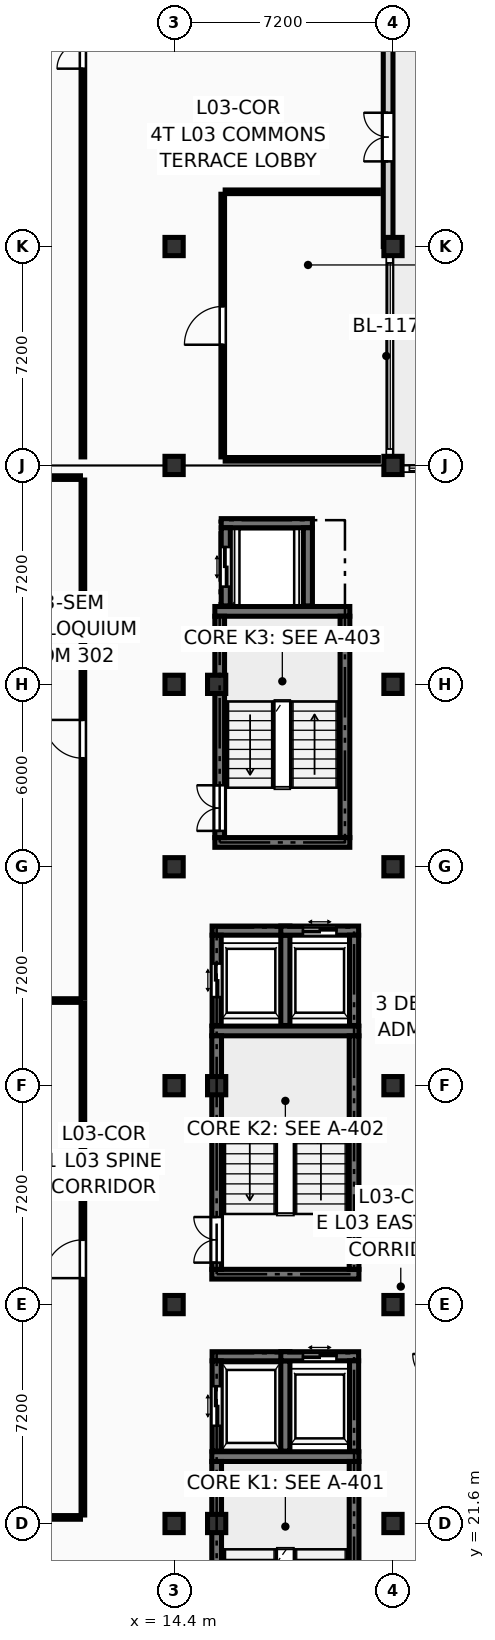
"""IFC4 building model, lengths in metres.
Left out: names, types, materials, properties, quantities, classifications, styles, units other than length and angle.
Written with IfcOpenShell. Run it as: python <this file> out.ifc"""

import sys

from ifc_helpers import new_model, si_unit, direction, frame, frame_2d, origin, origin_2d, place, context, subcontext, project, spatial, rectangle, extrude, element, fill, save


model = new_model("IFC4")
c1 = context("Model", 3, precision=1e-05, world=origin(), true_north=direction((0.0, 1.0)))
c2 = subcontext(c1, "Body", "Model", "MODEL_VIEW")
j1 = project(units=[si_unit("LENGTHUNIT", "METRE"), si_unit("PLANEANGLEUNIT", "RADIAN")], contexts=[c1])
p1 = place(None, origin())
s1 = spatial("IfcSite", under=j1, at=p1, CompositionType="ELEMENT")
p2 = place(p1, origin())
s2 = spatial("IfcBuilding", under=s1, at=p2, CompositionType="ELEMENT")
p3 = place(p2, frame((0.0, 0.0, 12.15)))
s3 = spatial("IfcBuildingStorey", under=s2, at=p3, CompositionType="ELEMENT", Elevation=12.15)
for number, where, z_axis, x_axis in (
    (1, (14.4, 21.6, 0.0), (0.0, 0.0, 1.0), (1.0, 0.0, 0.0)),
    (2, (14.4, 28.8, 0.0), (0.0, 0.0, 1.0), (1.0, 0.0, 0.0)),
    (3, (14.4, 36.0, 0.0), (0.0, 0.0, 1.0), (1.0, 0.0, 0.0)),
    (4, (14.4, 43.2, 0.0), (0.0, 0.0, 1.0), (1.0, 0.0, 0.0)),
    (5, (14.4, 49.2, 0.0), (0.0, 0.0, 1.0), (1.0, 0.0, 0.0)),
    (6, (14.4, 56.4, 0.0), (0.0, 0.0, 1.0), (1.0, 0.0, 0.0)),
    (7, (14.4, 63.6, 0.0), (0.0, 0.0, 1.0), (1.0, 0.0, 0.0)),
    (8, (15.8, 21.6, 0.0), (0.0, 0.0, 1.0), (1.0, 0.0, 0.0)),
    (9, (15.8, 36.0, 0.0), (0.0, 0.0, 1.0), (1.0, 0.0, 0.0)),
    (10, (15.8, 49.2, 0.0), (0.0, 0.0, 1.0), (1.0, 0.0, 0.0)),
    (11, (21.6, 21.6, 0.0), (0.0, 0.0, 1.0), (1.0, 0.0, 0.0)),
    (12, (21.6, 28.8, 0.0), (0.0, 0.0, 1.0), (1.0, 0.0, 0.0)),
    (13, (21.6, 36.0, 0.0), (0.0, 0.0, 1.0), (1.0, 0.0, 0.0)),
    (14, (21.6, 43.2, 0.0), (0.0, 0.0, 1.0), (1.0, 0.0, 0.0)),
    (15, (21.6, 49.2, 0.0), (0.0, 0.0, 1.0), (1.0, 0.0, 0.0)),
    (16, (21.6, 56.4, 0.0), (0.0, 0.0, 1.0), (1.0, 0.0, 0.0)),
    (17, (21.6, 63.6, 0.0), (0.0, 0.0, 1.0), (1.0, 0.0, 0.0)),
):
    element("IfcColumn", number, at=place(p3, frame(where, z_axis=z_axis, x_axis=x_axis)), inside=s3, PredefinedType="COLUMN", context=c2, shape_type="SweptSolid", body=[
        extrude(rectangle(XDim=0.6, YDim=0.6, at=origin_2d()), origin(), (0.0, 0.0, 1.0), 3.6),
    ])
p4 = place(p3, frame((21.44, 63.6, 0.0), z_axis=(0.0, 0.0, 1.0), x_axis=(0.0, 1.0, 0.0)))
e18 = element("IfcWall", 18, at=p4, inside=s3, PredefinedType="SOLIDWALL", context=c2, shape_type="SweptSolid", body=[
    extrude(rectangle(XDim=7.2, YDim=0.32, at=frame_2d((3.6, 0.0))), origin(), (0.0, 0.0, 1.0), 2.84),
])
p5 = place(p4, frame((2.8, 0.0, 0.0)))
e19 = element("IfcOpeningElement", 19, at=p5, cuts=e18, PredefinedType="OPENING", context=c2, shape_type="SweptSolid", body=[
    extrude(rectangle(XDim=1.6, YDim=2.25, at=frame_2d((0.8, 1.125))), frame((0.0, 0.172, 0.0), z_axis=(0.0, -1.0, 0.0), x_axis=(1.0, 0.0, 0.0)), (0.0, 0.0, 1.0), 0.344),
])
p6 = place(p3, frame((15.64, 23.8, 0.0), z_axis=(0.0, 0.0, 1.0), x_axis=(1.0, 0.0, 0.0)))
e20 = element("IfcWall", 20, at=p6, inside=s3, PredefinedType="SHEAR", context=c2, shape_type="SweptSolid", body=[
    extrude(rectangle(XDim=4.84, YDim=0.32, at=frame_2d((2.42, 0.0))), origin(), (0.0, 0.0, 1.0), 3.39),
])
p7 = place(p3, frame((15.8, 15.96, 0.0), z_axis=(0.0, 0.0, 1.0), x_axis=(0.0, 1.0, 0.0)))
e21 = element("IfcWall", 21, at=p7, inside=s3, PredefinedType="SHEAR", context=c2, shape_type="SweptSolid", body=[
    extrude(rectangle(XDim=7.68, YDim=0.32, at=frame_2d((3.84, 0.0))), origin(), (0.0, 0.0, 1.0), 3.39),
])
p8 = place(p7, frame((0.22, 0.0, 0.0)))
e22 = element("IfcOpeningElement", 22, at=p8, cuts=e21, PredefinedType="OPENING", context=c2, shape_type="SweptSolid", body=[
    extrude(rectangle(XDim=1.5, YDim=2.2, at=frame_2d((0.75, 1.1))), frame((0.0, 0.172, 0.0), z_axis=(0.0, -1.0, 0.0), x_axis=(1.0, 0.0, 0.0)), (0.0, 0.0, 1.0), 0.344),
])
p9 = place(p3, frame((20.32, 15.96, 0.0), z_axis=(0.0, 0.0, 1.0), x_axis=(0.0, 1.0, 0.0)))
e23 = element("IfcWall", 23, at=p9, inside=s3, PredefinedType="SHEAR", context=c2, shape_type="SweptSolid", body=[
    extrude(rectangle(XDim=7.68, YDim=0.32, at=frame_2d((3.84, 0.0))), origin(), (0.0, 0.0, 1.0), 3.39),
])
for number, where, z_axis, x_axis in (
    (24, (15.64, 29.8, 0.0), (0.0, 0.0, 1.0), (1.0, 0.0, 0.0)),
    (25, (15.64, 37.8, 0.0), (0.0, 0.0, 1.0), (1.0, 0.0, 0.0)),
):
    element("IfcWall", number, at=place(p3, frame(where, z_axis=z_axis, x_axis=x_axis)), inside=s3, PredefinedType="SHEAR", context=c2, shape_type="SweptSolid", body=[
        extrude(rectangle(XDim=4.84, YDim=0.32, at=frame_2d((2.42, 0.0))), origin(), (0.0, 0.0, 1.0), 3.39),
    ])
p10 = place(p3, frame((15.8, 29.96, 0.0), z_axis=(0.0, 0.0, 1.0), x_axis=(0.0, 1.0, 0.0)))
e26 = element("IfcWall", 26, at=p10, inside=s3, PredefinedType="SHEAR", context=c2, shape_type="SweptSolid", body=[
    extrude(rectangle(XDim=7.68, YDim=0.32, at=frame_2d((3.84, 0.0))), origin(), (0.0, 0.0, 1.0), 3.39),
])
p11 = place(p10, frame((0.22, 0.0, 0.0)))
e27 = element("IfcOpeningElement", 27, at=p11, cuts=e26, PredefinedType="OPENING", context=c2, shape_type="SweptSolid", body=[
    extrude(rectangle(XDim=1.5, YDim=2.2, at=frame_2d((0.75, 1.1))), frame((0.0, 0.172, 0.0), z_axis=(0.0, -1.0, 0.0), x_axis=(1.0, 0.0, 0.0)), (0.0, 0.0, 1.0), 0.344),
])
p12 = place(p3, frame((20.32, 29.96, 0.0), z_axis=(0.0, 0.0, 1.0), x_axis=(0.0, 1.0, 0.0)))
e28 = element("IfcWall", 28, at=p12, inside=s3, PredefinedType="SHEAR", context=c2, shape_type="SweptSolid", body=[
    extrude(rectangle(XDim=7.68, YDim=0.32, at=frame_2d((3.84, 0.0))), origin(), (0.0, 0.0, 1.0), 3.39),
])
for number, where, z_axis, x_axis in (
    (29, (15.74, 44.0, 0.0), (0.0, 0.0, 1.0), (1.0, 0.0, 0.0)),
    (30, (15.74, 51.6, 0.0), (0.0, 0.0, 1.0), (1.0, 0.0, 0.0)),
):
    element("IfcWall", number, at=place(p3, frame(where, z_axis=z_axis, x_axis=x_axis)), inside=s3, PredefinedType="SHEAR", context=c2, shape_type="SweptSolid", body=[
        extrude(rectangle(XDim=4.44, YDim=0.32, at=frame_2d((2.22, 0.0))), origin(), (0.0, 0.0, 1.0), 3.39),
    ])
p13 = place(p3, frame((15.9, 44.16, 0.0), z_axis=(0.0, 0.0, 1.0), x_axis=(0.0, 1.0, 0.0)))
e31 = element("IfcWall", 31, at=p13, inside=s3, PredefinedType="SHEAR", context=c2, shape_type="SweptSolid", body=[
    extrude(rectangle(XDim=7.28, YDim=0.32, at=frame_2d((3.64, 0.0))), origin(), (0.0, 0.0, 1.0), 3.39),
])
p14 = place(p13, frame((0.22, 0.0, 0.0)))
e32 = element("IfcOpeningElement", 32, at=p14, cuts=e31, PredefinedType="OPENING", context=c2, shape_type="SweptSolid", body=[
    extrude(rectangle(XDim=1.5, YDim=2.2, at=frame_2d((0.75, 1.1))), frame((0.0, 0.172, 0.0), z_axis=(0.0, -1.0, 0.0), x_axis=(1.0, 0.0, 0.0)), (0.0, 0.0, 1.0), 0.344),
])
p15 = place(p3, frame((20.02, 44.16, 0.0), z_axis=(0.0, 0.0, 1.0), x_axis=(0.0, 1.0, 0.0)))
e33 = element("IfcWall", 33, at=p15, inside=s3, PredefinedType="SHEAR", context=c2, shape_type="SweptSolid", body=[
    extrude(rectangle(XDim=7.28, YDim=0.32, at=frame_2d((3.64, 0.0))), origin(), (0.0, 0.0, 1.0), 3.39),
])
p16 = place(p3, frame((15.65, 27.1, 0.0), z_axis=(0.0, 0.0, 1.0), x_axis=(1.0, 0.0, 0.0)))
e34 = element("IfcWall", 34, at=p16, inside=s3, PredefinedType="SHEAR", context=c2, shape_type="SweptSolid", body=[
    extrude(rectangle(XDim=2.56, YDim=0.3, at=frame_2d((1.28, 0.0))), origin(), (0.0, 0.0, 1.0), 3.39),
])
p17 = place(p3, frame((15.8, 23.98, 0.0), z_axis=(0.0, 0.0, 1.0), x_axis=(0.0, 1.0, 0.0)))
e35 = element("IfcWall", 35, at=p17, inside=s3, PredefinedType="SHEAR", context=c2, shape_type="SweptSolid", body=[
    extrude(rectangle(XDim=2.97, YDim=0.3, at=frame_2d((1.485, 0.0))), origin(), (0.0, 0.0, 1.0), 3.39),
])
p18 = place(p17, frame((0.835, 0.0, 0.0)))
e36 = element("IfcOpeningElement", 36, at=p18, cuts=e35, PredefinedType="OPENING", context=c2, shape_type="SweptSolid", body=[
    extrude(rectangle(XDim=1.3, YDim=2.25, at=frame_2d((0.65, 1.125))), frame((0.0, 0.162, 0.0), z_axis=(0.0, -1.0, 0.0), x_axis=(1.0, 0.0, 0.0)), (0.0, 0.0, 1.0), 0.324),
])
p19 = place(p3, frame((18.06, 23.98, 0.0), z_axis=(0.0, 0.0, 1.0), x_axis=(0.0, 1.0, 0.0)))
e37 = element("IfcWall", 37, at=p19, inside=s3, PredefinedType="SHEAR", context=c2, shape_type="SweptSolid", body=[
    extrude(rectangle(XDim=2.97, YDim=0.3, at=frame_2d((1.485, 0.0))), origin(), (0.0, 0.0, 1.0), 3.39),
])
p20 = place(p3, frame((17.91, 27.1, 0.0), z_axis=(0.0, 0.0, 1.0), x_axis=(1.0, 0.0, 0.0)))
e38 = element("IfcWall", 38, at=p20, inside=s3, PredefinedType="SHEAR", context=c2, shape_type="SweptSolid", body=[
    extrude(rectangle(XDim=2.56, YDim=0.3, at=frame_2d((1.28, 0.0))), origin(), (0.0, 0.0, 1.0), 3.39),
])
p21 = place(p20, frame((0.73, 0.0, 0.0)))
e39 = element("IfcOpeningElement", 39, at=p21, cuts=e38, PredefinedType="OPENING", context=c2, shape_type="SweptSolid", body=[
    extrude(rectangle(XDim=1.1, YDim=2.2, at=frame_2d((0.55, 1.1))), frame((0.0, 0.162, 0.0), z_axis=(0.0, -1.0, 0.0), x_axis=(1.0, 0.0, 0.0)), (0.0, 0.0, 1.0), 0.324),
])
p22 = place(p3, frame((20.32, 23.98, 0.0), z_axis=(0.0, 0.0, 1.0), x_axis=(0.0, 1.0, 0.0)))
e40 = element("IfcWall", 40, at=p22, inside=s3, PredefinedType="SHEAR", context=c2, shape_type="SweptSolid", body=[
    extrude(rectangle(XDim=2.97, YDim=0.3, at=frame_2d((1.485, 0.0))), origin(), (0.0, 0.0, 1.0), 3.39),
])
p23 = place(p3, frame((15.65, 41.1, 0.0), z_axis=(0.0, 0.0, 1.0), x_axis=(1.0, 0.0, 0.0)))
e41 = element("IfcWall", 41, at=p23, inside=s3, PredefinedType="SHEAR", context=c2, shape_type="SweptSolid", body=[
    extrude(rectangle(XDim=2.56, YDim=0.3, at=frame_2d((1.28, 0.0))), origin(), (0.0, 0.0, 1.0), 3.39),
])
p24 = place(p3, frame((15.8, 37.98, 0.0), z_axis=(0.0, 0.0, 1.0), x_axis=(0.0, 1.0, 0.0)))
e42 = element("IfcWall", 42, at=p24, inside=s3, PredefinedType="SHEAR", context=c2, shape_type="SweptSolid", body=[
    extrude(rectangle(XDim=2.97, YDim=0.3, at=frame_2d((1.485, 0.0))), origin(), (0.0, 0.0, 1.0), 3.39),
])
p25 = place(p24, frame((0.935, 0.0, 0.0)))
e43 = element("IfcOpeningElement", 43, at=p25, cuts=e42, PredefinedType="OPENING", context=c2, shape_type="SweptSolid", body=[
    extrude(rectangle(XDim=1.1, YDim=2.2, at=frame_2d((0.55, 1.1))), frame((0.0, 0.162, 0.0), z_axis=(0.0, -1.0, 0.0), x_axis=(1.0, 0.0, 0.0)), (0.0, 0.0, 1.0), 0.324),
])
p26 = place(p3, frame((18.06, 37.98, 0.0), z_axis=(0.0, 0.0, 1.0), x_axis=(0.0, 1.0, 0.0)))
e44 = element("IfcWall", 44, at=p26, inside=s3, PredefinedType="SHEAR", context=c2, shape_type="SweptSolid", body=[
    extrude(rectangle(XDim=2.97, YDim=0.3, at=frame_2d((1.485, 0.0))), origin(), (0.0, 0.0, 1.0), 3.39),
])
p27 = place(p3, frame((17.91, 41.1, 0.0), z_axis=(0.0, 0.0, 1.0), x_axis=(1.0, 0.0, 0.0)))
e45 = element("IfcWall", 45, at=p27, inside=s3, PredefinedType="SHEAR", context=c2, shape_type="SweptSolid", body=[
    extrude(rectangle(XDim=2.56, YDim=0.3, at=frame_2d((1.28, 0.0))), origin(), (0.0, 0.0, 1.0), 3.39),
])
p28 = place(p27, frame((0.73, 0.0, 0.0)))
e46 = element("IfcOpeningElement", 46, at=p28, cuts=e45, PredefinedType="OPENING", context=c2, shape_type="SweptSolid", body=[
    extrude(rectangle(XDim=1.1, YDim=2.2, at=frame_2d((0.55, 1.1))), frame((0.0, 0.162, 0.0), z_axis=(0.0, -1.0, 0.0), x_axis=(1.0, 0.0, 0.0)), (0.0, 0.0, 1.0), 0.324),
])
p29 = place(p3, frame((20.32, 37.98, 0.0), z_axis=(0.0, 0.0, 1.0), x_axis=(0.0, 1.0, 0.0)))
e47 = element("IfcWall", 47, at=p29, inside=s3, PredefinedType="SHEAR", context=c2, shape_type="SweptSolid", body=[
    extrude(rectangle(XDim=2.97, YDim=0.3, at=frame_2d((1.485, 0.0))), origin(), (0.0, 0.0, 1.0), 3.39),
])
p30 = place(p3, frame((15.95, 54.5, 0.0), z_axis=(0.0, 0.0, 1.0), x_axis=(1.0, 0.0, 0.0)))
e48 = element("IfcWall", 48, at=p30, inside=s3, PredefinedType="SHEAR", context=c2, shape_type="SweptSolid", body=[
    extrude(rectangle(XDim=3.0, YDim=0.3, at=frame_2d((1.5, 0.0))), origin(), (0.0, 0.0, 1.0), 3.39),
])
p31 = place(p3, frame((16.1, 51.78, 0.0), z_axis=(0.0, 0.0, 1.0), x_axis=(0.0, 1.0, 0.0)))
e49 = element("IfcWall", 49, at=p31, inside=s3, PredefinedType="SHEAR", context=c2, shape_type="SweptSolid", body=[
    extrude(rectangle(XDim=2.57, YDim=0.3, at=frame_2d((1.285, 0.0))), origin(), (0.0, 0.0, 1.0), 3.39),
])
p32 = place(p31, frame((0.635, 0.0, 0.0)))
e50 = element("IfcOpeningElement", 50, at=p32, cuts=e49, PredefinedType="OPENING", context=c2, shape_type="SweptSolid", body=[
    extrude(rectangle(XDim=1.3, YDim=2.25, at=frame_2d((0.65, 1.125))), frame((0.0, 0.162, 0.0), z_axis=(0.0, -1.0, 0.0), x_axis=(1.0, 0.0, 0.0)), (0.0, 0.0, 1.0), 0.324),
])
p33 = place(p3, frame((18.8, 51.78, 0.0), z_axis=(0.0, 0.0, 1.0), x_axis=(0.0, 1.0, 0.0)))
e51 = element("IfcWall", 51, at=p33, inside=s3, PredefinedType="SHEAR", context=c2, shape_type="SweptSolid", body=[
    extrude(rectangle(XDim=2.57, YDim=0.3, at=frame_2d((1.285, 0.0))), origin(), (0.0, 0.0, 1.0), 3.39),
])
p34 = place(p3, frame((7.58, 21.8, 0.0), z_axis=(0.0, 0.0, 1.0), x_axis=(1.0, 0.0, 0.0)))
e52 = element("IfcWall", 52, at=p34, inside=s3, PredefinedType="PARTITIONING", context=c2, shape_type="SweptSolid", body=[
    extrude(rectangle(XDim=3.74, YDim=0.12, at=frame_2d((1.87, 0.0))), origin(), (0.0, 0.0, 1.0), 2.691),
])
p35 = place(p3, frame((11.4, 21.88, 0.0), z_axis=(0.0, 0.0, 1.0), x_axis=(0.0, 1.0, 0.0)))
e53 = element("IfcWall", 53, at=p35, inside=s3, PredefinedType="PARTITIONING", context=c2, shape_type="SweptSolid", body=[
    extrude(rectangle(XDim=16.84, YDim=0.12, at=frame_2d((8.42, 0.0))), origin(), (0.0, 0.0, 1.0), 3.375),
])
p36 = place(p35, frame((7.79, 0.0, 0.0)))
e54 = element("IfcOpeningElement", 54, at=p36, cuts=e53, PredefinedType="OPENING", context=c2, shape_type="SweptSolid", body=[
    extrude(rectangle(XDim=1.26, YDim=2.18, at=frame_2d((0.63, 1.09))), frame((0.0, 0.072, 0.0), z_axis=(0.0, -1.0, 0.0), x_axis=(1.0, 0.0, 0.0)), (0.0, 0.0, 1.0), 0.144),
])
p37 = place(p3, frame((7.58, 38.8, 0.0), z_axis=(0.0, 0.0, 1.0), x_axis=(1.0, 0.0, 0.0)))
e55 = element("IfcWall", 55, at=p37, inside=s3, PredefinedType="PARTITIONING", context=c2, shape_type="SweptSolid", body=[
    extrude(rectangle(XDim=3.74, YDim=0.12, at=frame_2d((1.87, 0.0))), origin(), (0.0, 0.0, 1.0), 3.375),
])
p38 = place(p3, frame((11.4, 38.88, 0.0), z_axis=(0.0, 0.0, 1.0), x_axis=(0.0, 1.0, 0.0)))
e56 = element("IfcWall", 56, at=p38, inside=s3, PredefinedType="PARTITIONING", context=c2, shape_type="SweptSolid", body=[
    extrude(rectangle(XDim=17.04, YDim=0.12, at=frame_2d((8.52, 0.0))), origin(), (0.0, 0.0, 1.0), 3.375),
])
p39 = place(p38, frame((7.89, 0.0, 0.0)))
e57 = element("IfcOpeningElement", 57, at=p39, cuts=e56, PredefinedType="OPENING", context=c2, shape_type="SweptSolid", body=[
    extrude(rectangle(XDim=1.26, YDim=2.18, at=frame_2d((0.63, 1.09))), frame((0.0, 0.072, 0.0), z_axis=(0.0, -1.0, 0.0), x_axis=(1.0, 0.0, 0.0)), (0.0, 0.0, 1.0), 0.144),
])
p40 = place(p3, frame((7.58, 56.0, 0.0), z_axis=(0.0, 0.0, 1.0), x_axis=(1.0, 0.0, 0.0)))
e58 = element("IfcWall", 58, at=p40, inside=s3, PredefinedType="PARTITIONING", context=c2, shape_type="SweptSolid", body=[
    extrude(rectangle(XDim=3.74, YDim=0.12, at=frame_2d((1.87, 0.0))), origin(), (0.0, 0.0, 1.0), 3.375),
])
p41 = place(p3, frame((11.4, 56.68, 0.0), z_axis=(0.0, 0.0, 1.0), x_axis=(0.0, 1.0, 0.0)))
e59 = element("IfcWall", 59, at=p41, inside=s3, PredefinedType="PARTITIONING", context=c2, shape_type="SweptSolid", body=[
    extrude(rectangle(XDim=27.24, YDim=0.12, at=frame_2d((13.62, 0.0))), origin(), (0.0, 0.0, 1.0), 3.375),
])
p42 = place(p41, frame((12.77, 0.0, 0.0)))
e60 = element("IfcOpeningElement", 60, at=p42, cuts=e59, PredefinedType="OPENING", context=c2, shape_type="SweptSolid", body=[
    extrude(rectangle(XDim=1.7, YDim=2.28, at=frame_2d((0.85, 1.14))), frame((0.0, 0.072, 0.0), z_axis=(0.0, -1.0, 0.0), x_axis=(1.0, 0.0, 0.0)), (0.0, 0.0, 1.0), 0.144),
])
p43 = place(p3, frame((16.0, 56.68, 0.0), z_axis=(0.0, 0.0, 1.0), x_axis=(0.0, 1.0, 0.0)))
e61 = element("IfcWall", 61, at=p43, inside=s3, PredefinedType="PARTITIONING", context=c2, shape_type="SweptSolid", body=[
    extrude(rectangle(XDim=8.64, YDim=0.12, at=frame_2d((4.32, 0.0))), origin(), (0.0, 0.0, 1.0), 3.375),
])
p44 = place(p43, frame((3.69, 0.0, 0.0)))
e62 = element("IfcOpeningElement", 62, at=p44, cuts=e61, PredefinedType="OPENING", context=c2, shape_type="SweptSolid", body=[
    extrude(rectangle(XDim=1.26, YDim=2.18, at=frame_2d((0.63, 1.09))), frame((0.0, 0.072, 0.0), z_axis=(0.0, -1.0, 0.0), x_axis=(1.0, 0.0, 0.0)), (0.0, 0.0, 1.0), 0.144),
])
p45 = place(p3, frame((16.08, 56.6, 0.0), z_axis=(0.0, 0.0, 1.0), x_axis=(1.0, 0.0, 0.0)))
e63 = element("IfcWall", 63, at=p45, inside=s3, PredefinedType="PARTITIONING", context=c2, shape_type="SweptSolid", body=[
    extrude(rectangle(XDim=5.04, YDim=0.12, at=frame_2d((2.52, 0.0))), origin(), (0.0, 0.0, 1.0), 2.691),
])
p46 = place(p3, frame((16.08, 65.4, 0.0), z_axis=(0.0, 0.0, 1.0), x_axis=(1.0, 0.0, 0.0)))
e64 = element("IfcWall", 64, at=p46, inside=s3, PredefinedType="PARTITIONING", context=c2, shape_type="SweptSolid", body=[
    extrude(rectangle(XDim=5.04, YDim=0.12, at=frame_2d((2.52, 0.0))), origin(), (0.0, 0.0, 1.0), 3.375),
])
p47 = place(p5, origin())
e65 = element("IfcDoor", 65, at=p47, inside=s3, OperationType="DOUBLE_DOOR_SINGLE_SWING", PredefinedType="DOOR", context=c2, shape_type="SweptSolid", body=[
    extrude(rectangle(XDim=1.6, YDim=2.25, at=frame_2d((0.8, 1.125))), frame((0.0, 0.025, 0.0), z_axis=(0.0, -1.0, 0.0), x_axis=(1.0, 0.0, 0.0)), (0.0, 0.0, 1.0), 0.05),
])
fill(e19, e65)
p48 = place(p11, origin())
e66 = element("IfcDoor", 66, at=p48, inside=s3, OperationType="DOUBLE_DOOR_SINGLE_SWING", PredefinedType="DOOR", context=c2, shape_type="SweptSolid", body=[
    extrude(rectangle(XDim=1.5, YDim=2.2, at=frame_2d((0.75, 1.1))), frame((0.0, 0.025, 0.0), z_axis=(0.0, -1.0, 0.0), x_axis=(1.0, 0.0, 0.0)), (0.0, 0.0, 1.0), 0.05),
])
fill(e27, e66)
p49 = place(p14, origin())
e67 = element("IfcDoor", 67, at=p49, inside=s3, OperationType="DOUBLE_DOOR_SINGLE_SWING", PredefinedType="DOOR", context=c2, shape_type="SweptSolid", body=[
    extrude(rectangle(XDim=1.5, YDim=2.2, at=frame_2d((0.75, 1.1))), frame((0.0, 0.025, 0.0), z_axis=(0.0, -1.0, 0.0), x_axis=(1.0, 0.0, 0.0)), (0.0, 0.0, 1.0), 0.05),
])
fill(e32, e67)
p50 = place(p18, origin())
e68 = element("IfcDoor", 68, at=p50, inside=s3, OperationType="DOUBLE_DOOR_SLIDING", PredefinedType="DOOR", context=c2, shape_type="SweptSolid", body=[
    extrude(rectangle(XDim=1.3, YDim=2.25, at=frame_2d((0.65, 1.125))), frame((0.0, 0.025, 0.0), z_axis=(0.0, -1.0, 0.0), x_axis=(1.0, 0.0, 0.0)), (0.0, 0.0, 1.0), 0.05),
])
fill(e36, e68)
p51 = place(p21, origin())
e69 = element("IfcDoor", 69, at=p51, inside=s3, OperationType="DOUBLE_DOOR_SLIDING", PredefinedType="DOOR", context=c2, shape_type="SweptSolid", body=[
    extrude(rectangle(XDim=1.1, YDim=2.2, at=frame_2d((0.55, 1.1))), frame((0.0, 0.025, 0.0), z_axis=(0.0, -1.0, 0.0), x_axis=(1.0, 0.0, 0.0)), (0.0, 0.0, 1.0), 0.05),
])
fill(e39, e69)
p52 = place(p25, origin())
e70 = element("IfcDoor", 70, at=p52, inside=s3, OperationType="DOUBLE_DOOR_SLIDING", PredefinedType="DOOR", context=c2, shape_type="SweptSolid", body=[
    extrude(rectangle(XDim=1.1, YDim=2.2, at=frame_2d((0.55, 1.1))), frame((0.0, 0.025, 0.0), z_axis=(0.0, -1.0, 0.0), x_axis=(1.0, 0.0, 0.0)), (0.0, 0.0, 1.0), 0.05),
])
fill(e43, e70)
p53 = place(p28, origin())
e71 = element("IfcDoor", 71, at=p53, inside=s3, OperationType="DOUBLE_DOOR_SLIDING", PredefinedType="DOOR", context=c2, shape_type="SweptSolid", body=[
    extrude(rectangle(XDim=1.1, YDim=2.2, at=frame_2d((0.55, 1.1))), frame((0.0, 0.025, 0.0), z_axis=(0.0, -1.0, 0.0), x_axis=(1.0, 0.0, 0.0)), (0.0, 0.0, 1.0), 0.05),
])
fill(e46, e71)
p54 = place(p32, origin())
e72 = element("IfcDoor", 72, at=p54, inside=s3, OperationType="DOUBLE_DOOR_SLIDING", PredefinedType="DOOR", context=c2, shape_type="SweptSolid", body=[
    extrude(rectangle(XDim=1.3, YDim=2.25, at=frame_2d((0.65, 1.125))), frame((0.0, 0.025, 0.0), z_axis=(0.0, -1.0, 0.0), x_axis=(1.0, 0.0, 0.0)), (0.0, 0.0, 1.0), 0.05),
])
fill(e50, e72)
p55 = place(p36, origin())
e73 = element("IfcDoor", 73, at=p55, inside=s3, OperationType="SINGLE_SWING_LEFT", PredefinedType="DOOR", context=c2, shape_type="SweptSolid", body=[
    extrude(rectangle(XDim=1.26, YDim=2.18, at=frame_2d((0.63, 1.09))), frame((0.0, 0.025, 0.0), z_axis=(0.0, -1.0, 0.0), x_axis=(1.0, 0.0, 0.0)), (0.0, 0.0, 1.0), 0.05),
])
fill(e54, e73)
p56 = place(p39, origin())
e74 = element("IfcDoor", 74, at=p56, inside=s3, OperationType="SINGLE_SWING_RIGHT", PredefinedType="DOOR", context=c2, shape_type="SweptSolid", body=[
    extrude(rectangle(XDim=1.26, YDim=2.18, at=frame_2d((0.63, 1.09))), frame((0.0, 0.025, 0.0), z_axis=(0.0, -1.0, 0.0), x_axis=(1.0, 0.0, 0.0)), (0.0, 0.0, 1.0), 0.05),
])
fill(e57, e74)
p57 = place(p42, origin())
e75 = element("IfcDoor", 75, at=p57, inside=s3, OperationType="DOUBLE_DOOR_SINGLE_SWING", PredefinedType="DOOR", context=c2, shape_type="SweptSolid", body=[
    extrude(rectangle(XDim=1.7, YDim=2.28, at=frame_2d((0.85, 1.14))), frame((0.0, 0.025, 0.0), z_axis=(0.0, -1.0, 0.0), x_axis=(1.0, 0.0, 0.0)), (0.0, 0.0, 1.0), 0.05),
])
fill(e60, e75)
p58 = place(p44, origin())
e76 = element("IfcDoor", 76, at=p58, inside=s3, OperationType="SINGLE_SWING_LEFT", PredefinedType="DOOR", context=c2, shape_type="SweptSolid", body=[
    extrude(rectangle(XDim=1.26, YDim=2.18, at=frame_2d((0.63, 1.09))), frame((0.0, 0.025, 0.0), z_axis=(0.0, -1.0, 0.0), x_axis=(1.0, 0.0, 0.0)), (0.0, 0.0, 1.0), 0.05),
])
fill(e62, e76)
save(model, sys.argv[1])
